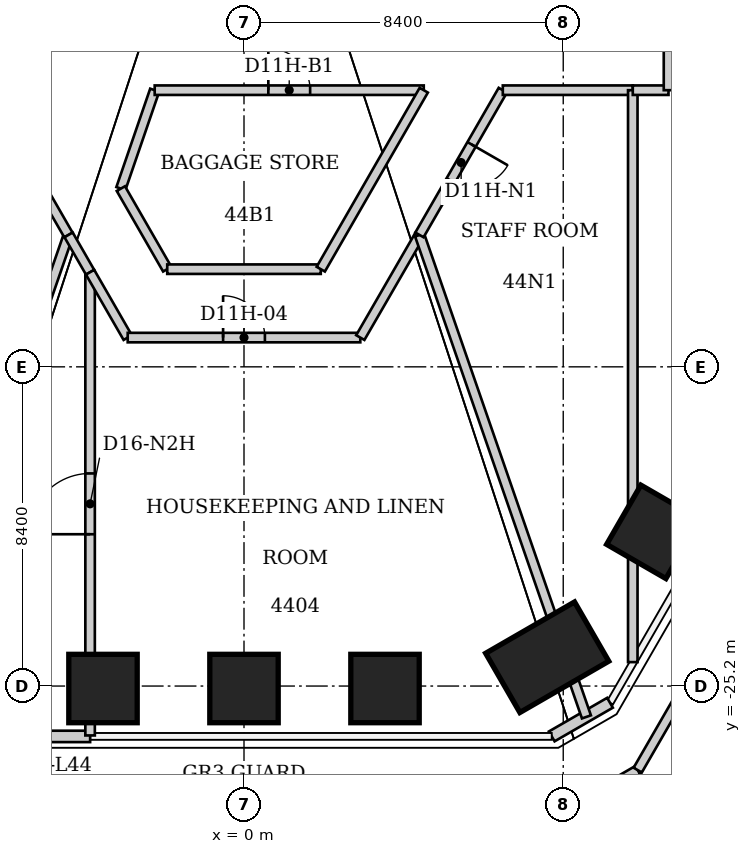
"""IFC4 building model, lengths in metres.
Left out: names, types, materials, properties, quantities, classifications, styles, units other than length and angle.
Written with IfcOpenShell. Run it as: python <this file> out.ifc"""

import sys

from ifc_helpers import new_model, si_unit, direction, frame, frame_2d, origin, origin_2d, place, context, subcontext, project, spatial, rectangle, extrude, clip, halfspace, element, fill, save


model = new_model("IFC4")
c1 = context("Model", 3, precision=1e-05, world=origin(), true_north=direction((0.0, 1.0)))
c2 = subcontext(c1, "Body", "Model", "MODEL_VIEW")
j1 = project(units=[si_unit("LENGTHUNIT", "METRE"), si_unit("PLANEANGLEUNIT", "RADIAN")], contexts=[c1])
p1 = place(None, origin())
s1 = spatial("IfcSite", under=j1, at=p1, CompositionType="ELEMENT")
p2 = place(p1, origin())
s2 = spatial("IfcBuilding", under=s1, at=p2, CompositionType="ELEMENT")
p3 = place(p2, frame((0.0, 0.0, 178.2)))
s3 = spatial("IfcBuildingStorey", under=s2, at=p3, CompositionType="ELEMENT", Elevation=178.2)
p4 = place(p3, frame((10.772, -21.142, -0.07), z_axis=(0.0, 0.0, 1.0), x_axis=(0.866025403784, -0.5, 0.0)))
e1 = element("IfcColumn", 1, at=p4, inside=s3, PredefinedType="COLUMN", context=c2, shape_type="SweptSolid", body=[
    clip(extrude(rectangle(XDim=1.8, YDim=1.8, at=origin_2d()), origin(), (0.0, 0.0, 1.0), 5.07), halfspace(frame((0.0, 0.0, 0.07)), True)),
])
p5 = place(p3, frame((7.979, -24.442, -0.071), z_axis=(0.0, 0.0, 1.0), x_axis=(0.5, -0.866025403784, 0.0)))
e2 = element("IfcColumn", 2, at=p5, inside=s3, PredefinedType="COLUMN", context=c2, shape_type="SweptSolid", body=[
    clip(extrude(rectangle(XDim=1.8, YDim=2.7, at=origin_2d()), origin(), (0.0, 0.0, 1.0), 5.071), halfspace(frame((0.0, 0.0, 0.071)), True)),
])
p6 = place(p3, frame((3.71, -25.265, -0.061), z_axis=(0.0, 0.0, 1.0), x_axis=(0.0, -1.0, 0.0)))
e3 = element("IfcColumn", 3, at=p6, inside=s3, PredefinedType="COLUMN", context=c2, shape_type="SweptSolid", body=[
    clip(extrude(rectangle(XDim=1.8, YDim=1.8, at=origin_2d()), origin(), (0.0, 0.0, 1.0), 5.061), halfspace(frame((0.0, 0.0, 0.061)), True)),
])
p7 = place(p3, frame((0.0, -25.265, -0.053), z_axis=(0.0, 0.0, 1.0), x_axis=(0.0, -1.0, 0.0)))
e4 = element("IfcColumn", 4, at=p7, inside=s3, PredefinedType="COLUMN", context=c2, shape_type="SweptSolid", body=[
    clip(extrude(rectangle(XDim=1.8, YDim=1.8, at=origin_2d()), origin(), (0.0, 0.0, 1.0), 5.053), halfspace(frame((0.0, 0.0, 0.053)), True)),
])
p8 = place(p3, frame((-3.71, -25.265, -0.061), z_axis=(0.0, 0.0, 1.0), x_axis=(0.0, -1.0, 0.0)))
e5 = element("IfcColumn", 5, at=p8, inside=s3, PredefinedType="COLUMN", context=c2, shape_type="SweptSolid", body=[
    clip(extrude(rectangle(XDim=1.8, YDim=1.8, at=origin_2d()), origin(), (0.0, 0.0, 1.0), 5.061), halfspace(frame((0.0, 0.0, 0.061)), True)),
])
p9 = place(p3, frame((9.63, -25.64, 0.0), z_axis=(0.0, 0.0, 1.0), x_axis=(-0.866036293601, -0.499981137809, 0.0)))
e6 = element("IfcWall", 6, at=p9, inside=s3, PredefinedType="SOLIDWALL", context=c2, shape_type="SweptSolid", body=[
    extrude(rectangle(XDim=1.77, YDim=0.3, at=frame_2d((0.885, 0.0))), origin(), (0.0, 0.0, 1.0), 4.84),
])
p10 = place(p3, frame((-4.049, -26.525, 0.0), z_axis=(0.0, 0.0, 1.0), x_axis=(-1.0, 0.0, 0.0)))
e7 = element("IfcWall", 7, at=p10, inside=s3, PredefinedType="SOLIDWALL", context=c2, shape_type="SweptSolid", body=[
    extrude(rectangle(XDim=4.049, YDim=0.3, at=frame_2d((2.024, 0.0))), origin(), (0.0, 0.0, 1.0), 4.84),
])
p11 = place(p10, frame((1.524, 0.0, 0.0)))
e8 = element("IfcOpeningElement", 8, at=p11, cuts=e7, PredefinedType="OPENING", context=c2, shape_type="SweptSolid", body=[
    extrude(rectangle(XDim=1.0, YDim=2.2, at=frame_2d((0.5, 1.1))), frame((0.0, 0.15, 0.0), z_axis=(0.0, -1.0, 0.0), x_axis=(1.0, 0.0, 0.0)), (0.0, 0.0, 1.0), 0.3),
])
p12 = place(p3, frame((8.74, -28.349, 0.0), z_axis=(0.0, 0.0, 1.0), x_axis=(0.865515622283, 0.500881929783, 0.0)))
e9 = element("IfcWall", 9, at=p12, inside=s3, PredefinedType="PARAPET", context=c2, shape_type="SweptSolid", body=[
    extrude(rectangle(XDim=1.871, YDim=0.25, at=frame_2d((0.935, 0.0))), origin(), (0.0, 0.0, 1.0), 1.1),
])
p13 = place(p3, frame((10.36, -27.412, 0.0), z_axis=(0.0, 0.0, 1.0), x_axis=(0.500001430823, 0.866024577697, 0.0)))
e10 = element("IfcWall", 10, at=p13, inside=s3, PredefinedType="PARAPET", context=c2, shape_type="SweptSolid", body=[
    extrude(rectangle(XDim=37.119, YDim=0.25, at=frame_2d((18.56, 0.0))), origin(), (0.0, 0.0, 1.0), 1.1),
])
p14 = place(p3, frame((-4.62, -13.33, 0.0), z_axis=(0.0, 0.0, 1.0), x_axis=(-0.327133057776, -0.944978286793, 0.0)))
e11 = element("IfcWall", 11, at=p14, inside=s3, PredefinedType="PARTITIONING", context=c2, shape_type="SweptSolid", body=[
    extrude(rectangle(XDim=13.42, YDim=0.25, at=frame_2d((6.71, 0.0))), origin(), (0.0, 0.0, 1.0), 4.84),
])
p15 = place(p3, frame((-4.62, -13.33, 0.0), z_axis=(0.0, 0.0, 1.0), x_axis=(-0.49848958573, 0.86689568745, 0.0)))
e12 = element("IfcWall", 12, at=p15, inside=s3, PredefinedType="PARTITIONING", context=c2, shape_type="SweptSolid", body=[
    extrude(rectangle(XDim=3.23, YDim=0.25, at=frame_2d((1.615, 0.0))), origin(), (0.0, 0.0, 1.0), 4.84),
])
p16 = place(p3, frame((-4.05, -26.5, 0.0), z_axis=(0.0, 0.0, 1.0), x_axis=(0.0, 1.0, 0.0)))
e13 = element("IfcWall", 13, at=p16, inside=s3, PredefinedType="PARTITIONING", context=c2, shape_type="SweptSolid", body=[
    extrude(rectangle(XDim=12.19, YDim=0.25, at=frame_2d((6.095, 0.0))), origin(), (0.0, 0.0, 1.0), 4.84),
])
p17 = place(p16, frame((5.295, 0.0, 0.0)))
e14 = element("IfcOpeningElement", 14, at=p17, cuts=e13, PredefinedType="OPENING", context=c2, shape_type="SweptSolid", body=[
    extrude(rectangle(XDim=1.6, YDim=2.4, at=frame_2d((0.8, 1.2))), frame((0.0, 0.125, 0.0), z_axis=(0.0, -1.0, 0.0), x_axis=(1.0, 0.0, 0.0)), (0.0, 0.0, 1.0), 0.25),
])
p18 = place(p3, frame((-4.05, -14.31, 0.0), z_axis=(0.0, 0.0, 1.0), x_axis=(-0.498895837979, 0.866661954194, 0.0)))
e15 = element("IfcWall", 15, at=p18, inside=s3, PredefinedType="PARTITIONING", context=c2, shape_type="SweptSolid", body=[
    extrude(rectangle(XDim=1.134, YDim=0.25, at=frame_2d((0.567, 0.0))), origin(), (0.0, 0.0, 1.0), 4.84),
])
p19 = place(p3, frame((-4.05, -14.31, 0.0), z_axis=(0.0, 0.0, 1.0), x_axis=(0.498852448655, -0.866686929907, 0.0)))
e16 = element("IfcWall", 16, at=p19, inside=s3, PredefinedType="PARTITIONING", context=c2, shape_type="SweptSolid", body=[
    extrude(rectangle(XDim=1.985, YDim=0.25, at=frame_2d((0.992, 0.0))), origin(), (0.0, 0.0, 1.0), 4.84),
])
p20 = place(p3, frame((-3.24, -12.11, 0.0), z_axis=(0.0, 0.0, 1.0), x_axis=(0.324932772994, 0.94573711624, 0.0)))
e17 = element("IfcWall", 17, at=p20, inside=s3, PredefinedType="PARTITIONING", context=c2, shape_type="SweptSolid", body=[
    extrude(rectangle(XDim=2.739, YDim=0.25, at=frame_2d((1.369, 0.0))), origin(), (0.0, 0.0, 1.0), 4.84),
])
p21 = place(p3, frame((-3.06, -16.03, 0.0), z_axis=(0.0, 0.0, 1.0), x_axis=(1.0, 0.0, 0.0)))
e18 = element("IfcWall", 18, at=p21, inside=s3, PredefinedType="PARTITIONING", context=c2, shape_type="SweptSolid", body=[
    extrude(rectangle(XDim=6.12, YDim=0.25, at=frame_2d((3.06, 0.0))), origin(), (0.0, 0.0, 1.0), 4.84),
])
p22 = place(p21, frame((2.51, 0.0, 0.0)))
e19 = element("IfcOpeningElement", 19, at=p22, cuts=e18, PredefinedType="OPENING", context=c2, shape_type="SweptSolid", body=[
    extrude(rectangle(XDim=1.1, YDim=2.2, at=frame_2d((0.55, 1.1))), frame((0.0, 0.125, 0.0), z_axis=(0.0, -1.0, 0.0), x_axis=(1.0, 0.0, 0.0)), (0.0, 0.0, 1.0), 0.25),
])
p23 = place(p3, frame((-2.35, -9.52, 0.0), z_axis=(0.0, 0.0, 1.0), x_axis=(1.0, 0.0, 0.0)))
e20 = element("IfcWall", 20, at=p23, inside=s3, PredefinedType="PARTITIONING", context=c2, shape_type="SweptSolid", body=[
    extrude(rectangle(XDim=7.08, YDim=0.25, at=frame_2d((3.54, 0.0))), origin(), (0.0, 0.0, 1.0), 4.84),
])
p24 = place(p23, frame((2.99, 0.0, 0.0)))
e21 = element("IfcOpeningElement", 21, at=p24, cuts=e20, PredefinedType="OPENING", context=c2, shape_type="SweptSolid", body=[
    extrude(rectangle(XDim=1.1, YDim=2.2, at=frame_2d((0.55, 1.1))), frame((0.0, 0.125, 0.0), z_axis=(0.0, -1.0, 0.0), x_axis=(1.0, 0.0, 0.0)), (0.0, 0.0, 1.0), 0.25),
])
p25 = place(p3, frame((-2.02, -14.23, 0.0), z_axis=(0.0, 0.0, 1.0), x_axis=(-0.498748634132, 0.866746675766, 0.0)))
e22 = element("IfcWall", 22, at=p25, inside=s3, PredefinedType="PARTITIONING", context=c2, shape_type="SweptSolid", body=[
    extrude(rectangle(XDim=2.446, YDim=0.25, at=frame_2d((1.223, 0.0))), origin(), (0.0, 0.0, 1.0), 4.84),
])
p26 = place(p3, frame((2.02, -14.23, 0.0), z_axis=(0.0, 0.0, 1.0), x_axis=(-1.0, 0.0, 0.0)))
e23 = element("IfcWall", 23, at=p26, inside=s3, PredefinedType="PARTITIONING", context=c2, shape_type="SweptSolid", body=[
    extrude(rectangle(XDim=4.04, YDim=0.25, at=frame_2d((2.02, 0.0))), origin(), (0.0, 0.0, 1.0), 4.84),
])
p27 = place(p3, frame((3.06, -16.03, 0.0), z_axis=(0.0, 0.0, 1.0), x_axis=(0.500298468391, 0.865853014388, 0.0)))
e24 = element("IfcWall", 24, at=p27, inside=s3, PredefinedType="PARTITIONING", context=c2, shape_type="SweptSolid", body=[
    extrude(rectangle(XDim=3.118, YDim=0.25, at=frame_2d((1.559, 0.0))), origin(), (0.0, 0.0, 1.0), 4.84),
])
p28 = place(p3, frame((4.62, -13.33, 0.0), z_axis=(0.0, 0.0, 1.0), x_axis=(0.327133057776, -0.944978286793, 0.0)))
e25 = element("IfcWall", 25, at=p28, inside=s3, PredefinedType="PARTITIONING", context=c2, shape_type="SweptSolid", body=[
    extrude(rectangle(XDim=13.42, YDim=0.25, at=frame_2d((6.71, 0.0))), origin(), (0.0, 0.0, 1.0), 4.84),
])
p29 = place(p3, frame((4.73, -9.52, 0.0), z_axis=(0.0, 0.0, 1.0), x_axis=(-0.498710838572, -0.86676842322, 0.0)))
e26 = element("IfcWall", 26, at=p29, inside=s3, PredefinedType="PARTITIONING", context=c2, shape_type="SweptSolid", body=[
    extrude(rectangle(XDim=5.434, YDim=0.25, at=frame_2d((2.717, 0.0))), origin(), (0.0, 0.0, 1.0), 4.84),
])
p30 = place(p3, frame((6.81, -9.52, 0.0), z_axis=(0.0, 0.0, 1.0), x_axis=(-0.49916925958, -0.866504501021, 0.0)))
e27 = element("IfcWall", 27, at=p30, inside=s3, PredefinedType="PARTITIONING", context=c2, shape_type="SweptSolid", body=[
    extrude(rectangle(XDim=4.395, YDim=0.25, at=frame_2d((2.197, 0.0))), origin(), (0.0, 0.0, 1.0), 4.84),
])
p31 = place(p30, frame((1.647, 0.0, 0.0)))
e28 = element("IfcOpeningElement", 28, at=p31, cuts=e27, PredefinedType="OPENING", context=c2, shape_type="SweptSolid", body=[
    extrude(rectangle(XDim=1.1, YDim=2.2, at=frame_2d((0.55, 1.1))), frame((0.0, 0.125, 0.0), z_axis=(0.0, -1.0, 0.0), x_axis=(1.0, 0.0, 0.0)), (0.0, 0.0, 1.0), 0.25),
])
p32 = place(p3, frame((6.81, -9.52, 0.0), z_axis=(0.0, 0.0, 1.0), x_axis=(1.0, 0.0, 0.0)))
e29 = element("IfcWall", 29, at=p32, inside=s3, PredefinedType="PARTITIONING", context=c2, shape_type="SweptSolid", body=[
    extrude(rectangle(XDim=3.42, YDim=0.25, at=frame_2d((1.71, 0.0))), origin(), (0.0, 0.0, 1.0), 4.84),
])
p33 = place(p3, frame((10.23, -24.57, 0.0), z_axis=(0.0, 0.0, 1.0), x_axis=(0.0, 1.0, 0.0)))
e30 = element("IfcWall", 30, at=p33, inside=s3, PredefinedType="PARTITIONING", context=c2, shape_type="SweptSolid", body=[
    extrude(rectangle(XDim=15.05, YDim=0.25, at=frame_2d((7.525, 0.0))), origin(), (0.0, 0.0, 1.0), 4.84),
])
p34 = place(p3, frame((10.23, -9.52, 0.0), z_axis=(0.0, 0.0, 1.0), x_axis=(1.0, 0.0, 0.0)))
e31 = element("IfcWall", 31, at=p34, inside=s3, PredefinedType="PARTITIONING", context=c2, shape_type="SweptSolid", body=[
    extrude(rectangle(XDim=0.94, YDim=0.25, at=frame_2d((0.47, 0.0))), origin(), (0.0, 0.0, 1.0), 4.84),
])
p35 = place(p3, frame((11.17, -9.52, 0.0), z_axis=(0.0, 0.0, 1.0), x_axis=(0.0, 1.0, 0.0)))
e32 = element("IfcWall", 32, at=p35, inside=s3, PredefinedType="PARTITIONING", context=c2, shape_type="SweptSolid", body=[
    extrude(rectangle(XDim=7.55, YDim=0.25, at=frame_2d((3.775, 0.0))), origin(), (0.0, 0.0, 1.0), 4.84),
])
p36 = place(p35, frame((2.975, 0.0, 0.0)))
e33 = element("IfcOpeningElement", 33, at=p36, cuts=e32, PredefinedType="OPENING", context=c2, shape_type="SweptSolid", body=[
    extrude(rectangle(XDim=1.6, YDim=2.4, at=frame_2d((0.8, 1.2))), frame((0.0, 0.125, 0.0), z_axis=(0.0, -1.0, 0.0), x_axis=(1.0, 0.0, 0.0)), (0.0, 0.0, 1.0), 0.25),
])
p37 = place(p22, origin())
e34 = element("IfcDoor", 34, at=p37, inside=s3, OperationType="SINGLE_SWING_LEFT", PredefinedType="DOOR", context=c2, shape_type="SweptSolid", body=[
    extrude(rectangle(XDim=1.1, YDim=2.2, at=frame_2d((0.55, 1.1))), frame((0.0, 0.025, 0.0), z_axis=(0.0, -1.0, 0.0), x_axis=(1.0, 0.0, 0.0)), (0.0, 0.0, 1.0), 0.05),
])
fill(e19, e34)
p38 = place(p24, origin())
e35 = element("IfcDoor", 35, at=p38, inside=s3, OperationType="SINGLE_SWING_LEFT", PredefinedType="DOOR", context=c2, shape_type="SweptSolid", body=[
    extrude(rectangle(XDim=1.1, YDim=2.2, at=frame_2d((0.55, 1.1))), frame((0.0, 0.025, 0.0), z_axis=(0.0, -1.0, 0.0), x_axis=(1.0, 0.0, 0.0)), (0.0, 0.0, 1.0), 0.05),
])
fill(e21, e35)
p39 = place(p31, origin())
e36 = element("IfcDoor", 36, at=p39, inside=s3, OperationType="SINGLE_SWING_LEFT", PredefinedType="DOOR", context=c2, shape_type="SweptSolid", body=[
    extrude(rectangle(XDim=1.1, YDim=2.2, at=frame_2d((0.55, 1.1))), frame((0.0, 0.025, 0.0), z_axis=(0.0, -1.0, 0.0), x_axis=(1.0, 0.0, 0.0)), (0.0, 0.0, 1.0), 0.05),
])
fill(e28, e36)
p40 = place(p17, origin())
e37 = element("IfcDoor", 37, at=p40, inside=s3, OperationType="DOUBLE_DOOR_SINGLE_SWING", PredefinedType="DOOR", context=c2, shape_type="SweptSolid", body=[
    extrude(rectangle(XDim=1.6, YDim=2.4, at=frame_2d((0.8, 1.2))), frame((0.0, 0.025, 0.0), z_axis=(0.0, -1.0, 0.0), x_axis=(1.0, 0.0, 0.0)), (0.0, 0.0, 1.0), 0.05),
])
fill(e14, e37)
save(model, sys.argv[1])
